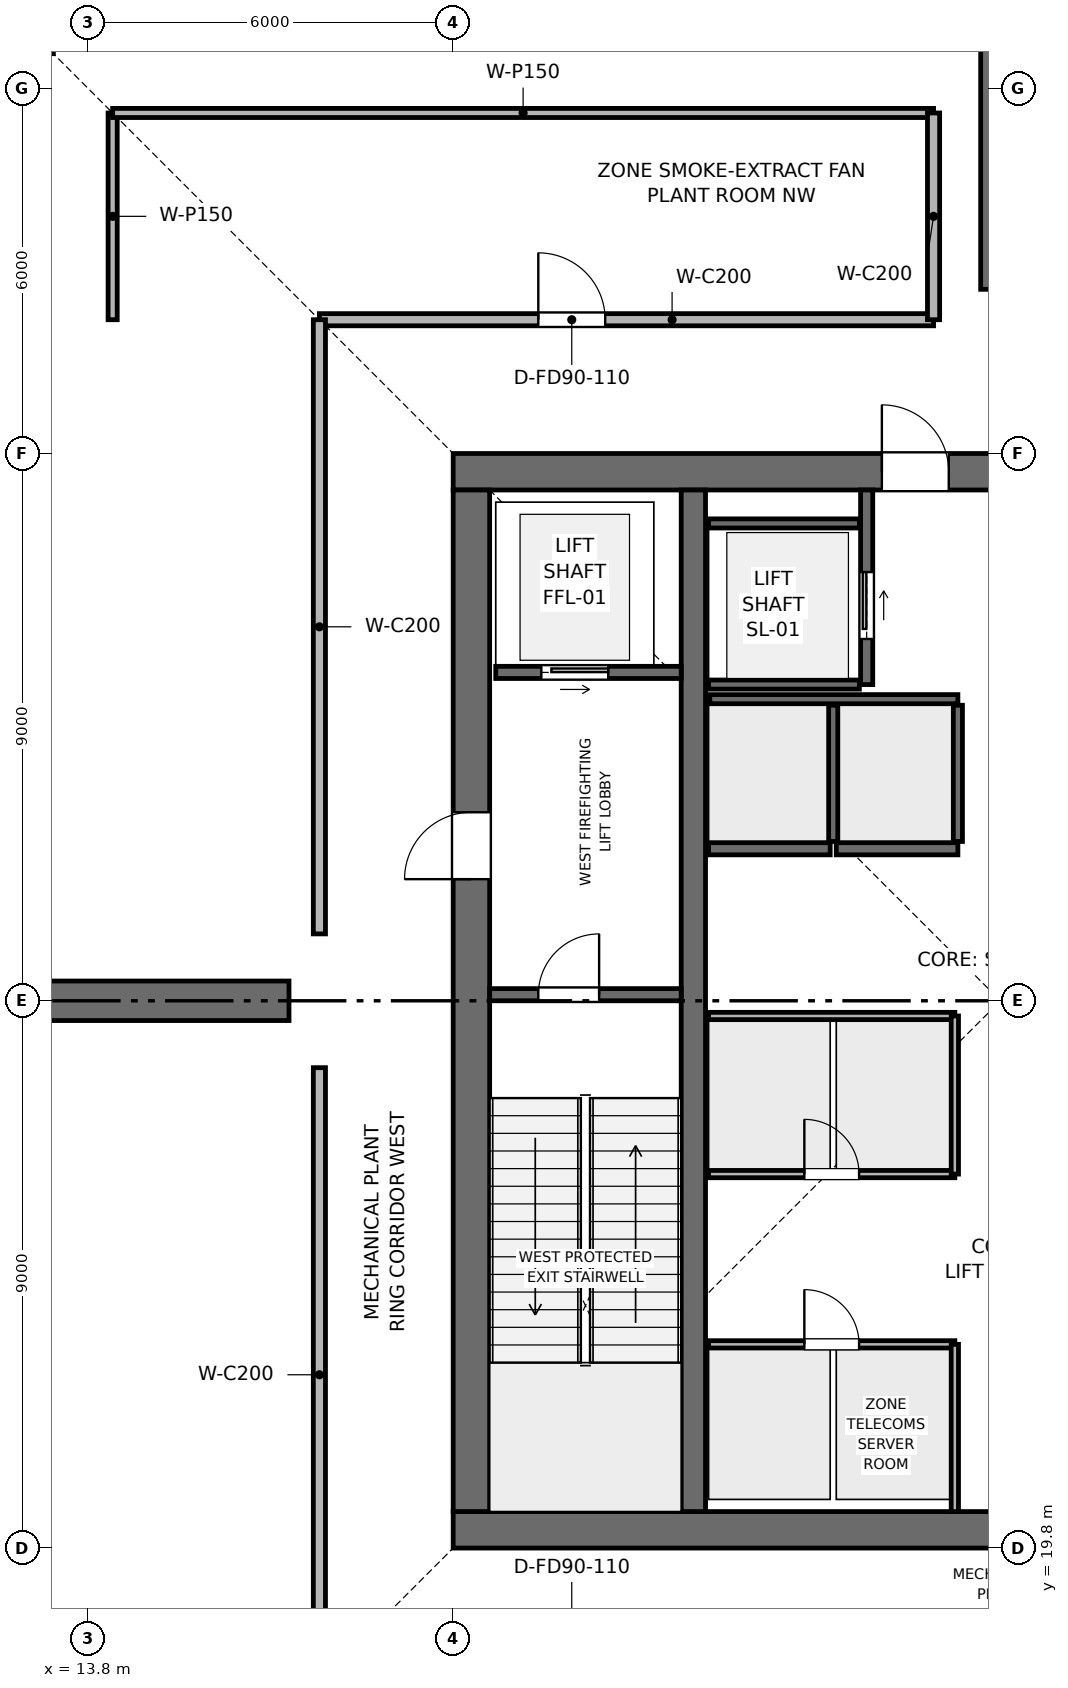
"""IFC4 building model, lengths in metres.
Left out: names, types, materials, properties, quantities, classifications, styles, units other than length and angle.
Written with IfcOpenShell. Run it as: python <this file> out.ifc"""

import sys

from ifc_helpers import new_model, si_unit, direction, frame, frame_2d, origin, origin_2d, place, context, subcontext, project, spatial, rectangle, extrude, element, fill, save


model = new_model("IFC4")
c1 = context("Model", 3, precision=1e-05, world=origin(), true_north=direction((0.0, 1.0)))
c2 = subcontext(c1, "Body", "Model", "MODEL_VIEW")
j1 = project(units=[si_unit("LENGTHUNIT", "METRE"), si_unit("PLANEANGLEUNIT", "RADIAN")], contexts=[c1])
p1 = place(None, origin())
s1 = spatial("IfcSite", under=j1, at=p1, CompositionType="ELEMENT")
p2 = place(p1, origin())
s2 = spatial("IfcBuilding", under=s1, at=p2, CompositionType="ELEMENT")
p3 = place(p2, frame((0.0, 0.0, 284.1)))
s3 = spatial("IfcBuildingStorey", under=s2, at=p3, CompositionType="ELEMENT", Elevation=284.1)
p4 = place(p3, frame((19.8, 20.1, 0.0), z_axis=(0.0, 0.0, 1.0), x_axis=(1.0, 0.0, 0.0)))
e1 = element("IfcWall", 1, at=p4, inside=s3, PredefinedType="SHEAR", context=c2, shape_type="SweptSolid", body=[
    extrude(rectangle(XDim=18.0, YDim=0.6, at=frame_2d((9.0, 0.0))), origin(), (0.0, 0.0, 1.0), 5.4),
])
p5 = place(p3, frame((19.8, 37.5, 0.0), z_axis=(0.0, 0.0, 1.0), x_axis=(1.0, 0.0, 0.0)))
e2 = element("IfcWall", 2, at=p5, inside=s3, PredefinedType="SHEAR", context=c2, shape_type="SweptSolid", body=[
    extrude(rectangle(XDim=18.0, YDim=0.6, at=frame_2d((9.0, 0.0))), origin(), (0.0, 0.0, 1.0), 5.4),
])
p6 = place(p5, frame((7.05, 0.0, 0.0)))
e3 = element("IfcOpeningElement", 3, at=p6, cuts=e2, PredefinedType="OPENING", context=c2, shape_type="SweptSolid", body=[
    extrude(rectangle(XDim=1.1, YDim=2.15, at=frame_2d((0.55, 1.075))), frame((0.0, 0.31, 0.0), z_axis=(0.0, -1.0, 0.0), x_axis=(1.0, 0.0, 0.0)), (0.0, 0.0, 1.0), 0.62),
])
p7 = place(p3, frame((20.1, 20.4, 0.0), z_axis=(0.0, 0.0, 1.0), x_axis=(0.0, 1.0, 0.0)))
e4 = element("IfcWall", 4, at=p7, inside=s3, PredefinedType="SHEAR", context=c2, shape_type="SweptSolid", body=[
    extrude(rectangle(XDim=16.8, YDim=0.6, at=frame_2d((8.4, 0.0))), origin(), (0.0, 0.0, 1.0), 5.4),
])
p8 = place(p7, frame((10.4, 0.0, 0.0)))
e5 = element("IfcOpeningElement", 5, at=p8, cuts=e4, PredefinedType="OPENING", context=c2, shape_type="SweptSolid", body=[
    extrude(rectangle(XDim=1.1, YDim=2.15, at=frame_2d((0.55, 1.075))), frame((0.0, 0.31, 0.0), z_axis=(0.0, -1.0, 0.0), x_axis=(1.0, 0.0, 0.0)), (0.0, 0.0, 1.0), 0.62),
])
p9 = place(p3, frame((23.75, 20.4, 0.0), z_axis=(0.0, 0.0, 1.0), x_axis=(0.0, 1.0, 0.0)))
e6 = element("IfcWall", 6, at=p9, inside=s3, PredefinedType="SHEAR", context=c2, shape_type="SweptSolid", body=[
    extrude(rectangle(XDim=16.8, YDim=0.4, at=frame_2d((8.4, 0.0))), origin(), (0.0, 0.0, 1.0), 5.4),
])
p10 = place(p3, frame((12.75, 44.85, 0.003), z_axis=(0.109878322657, -0.109878322657, 0.987852979152), x_axis=(0.707106781187, 0.707106781187, 0.0)))
e7 = element("IfcColumn", 7, at=p10, inside=s3, PredefinedType="COLUMN", context=c2, shape_type="SweptSolid", body=[
    extrude(rectangle(XDim=0.95, YDim=0.95, at=origin_2d()), origin(), (0.0, 0.0, 1.0), 5.106),
])
p11 = place(p3, frame((28.8, 40.5, 0.0), z_axis=(0.0, 0.0, 1.0), x_axis=(0.0, 1.0, 0.0)))
e8 = element("IfcWall", 8, at=p11, inside=s3, PredefinedType="SHEAR", context=c2, shape_type="SweptSolid", body=[
    extrude(rectangle(XDim=10.025, YDim=0.65, at=frame_2d((5.012, 0.0))), origin(), (0.0, 0.0, 1.0), 5.05),
])
p12 = place(p3, frame((17.1, 28.8, 0.0), z_axis=(0.0, 0.0, 1.0), x_axis=(-1.0, 0.0, 0.0)))
e9 = element("IfcWall", 9, at=p12, inside=s3, PredefinedType="SHEAR", context=c2, shape_type="SweptSolid", body=[
    extrude(rectangle(XDim=10.025, YDim=0.65, at=frame_2d((5.013, 0.0))), origin(), (0.0, 0.0, 1.0), 5.05),
])
p13 = place(p3, frame((20.4, 28.9, 0.0), z_axis=(0.0, 0.0, 1.0), x_axis=(1.0, 0.0, 0.0)))
e10 = element("IfcWall", 10, at=p13, inside=s3, PredefinedType="SHEAR", context=c2, shape_type="SweptSolid", body=[
    extrude(rectangle(XDim=3.15, YDim=0.2, at=frame_2d((1.575, 0.0))), origin(), (0.0, 0.0, 1.0), 5.05),
])
p14 = place(p13, frame((0.8, 0.0, 0.0)))
e11 = element("IfcOpeningElement", 11, at=p14, cuts=e10, PredefinedType="OPENING", context=c2, shape_type="SweptSolid", body=[
    extrude(rectangle(XDim=1.0, YDim=2.1, at=frame_2d((0.5, 1.05))), frame((0.0, 0.11, 0.0), z_axis=(0.0, -1.0, 0.0), x_axis=(1.0, 0.0, 0.0)), (0.0, 0.0, 1.0), 0.22),
])
p15 = place(p3, frame((20.5, 34.2, 0.0), z_axis=(0.0, 0.0, 1.0), x_axis=(1.0, 0.0, 0.0)))
e12 = element("IfcWall", 12, at=p15, inside=s3, PredefinedType="SHEAR", context=c2, shape_type="SweptSolid", body=[
    extrude(rectangle(XDim=3.05, YDim=0.2, at=frame_2d((1.525, 0.0))), origin(), (0.0, 0.0, 1.0), 5.05),
])
p16 = place(p15, frame((0.75, 0.0, 0.0)))
e13 = element("IfcOpeningElement", 13, at=p16, cuts=e12, PredefinedType="OPENING", context=c2, shape_type="SweptSolid", body=[
    extrude(rectangle(XDim=1.1, YDim=2.15, at=frame_2d((0.55, 1.075))), frame((0.0, 0.11, 0.0), z_axis=(0.0, -1.0, 0.0), x_axis=(1.0, 0.0, 0.0)), (0.0, 0.0, 1.0), 0.22),
])
p17 = place(p3, frame((26.6, 34.0, 0.0), z_axis=(0.0, 0.0, 1.0), x_axis=(0.0, 1.0, 0.0)))
e14 = element("IfcWall", 14, at=p17, inside=s3, PredefinedType="SHEAR", context=c2, shape_type="SweptSolid", body=[
    extrude(rectangle(XDim=3.2, YDim=0.2, at=frame_2d((1.6, 0.0))), origin(), (0.0, 0.0, 1.0), 5.05),
])
p18 = place(p17, frame((0.75, 0.0, 0.0)))
e15 = element("IfcOpeningElement", 15, at=p18, cuts=e14, PredefinedType="OPENING", context=c2, shape_type="SweptSolid", body=[
    extrude(rectangle(XDim=1.1, YDim=2.15, at=frame_2d((0.55, 1.075))), frame((0.0, 0.11, 0.0), z_axis=(0.0, -1.0, 0.0), x_axis=(1.0, 0.0, 0.0)), (0.0, 0.0, 1.0), 0.22),
])
for number, where, z_axis, x_axis in (
    (16, (24.0, 34.0, 0.0), (0.0, 0.0, 1.0), (1.0, 0.0, 0.0)),
    (17, (24.0, 36.65, 0.0), (0.0, 0.0, 1.0), (1.0, 0.0, 0.0)),
):
    element("IfcWall", number, at=place(p3, frame(where, z_axis=z_axis, x_axis=x_axis)), inside=s3, PredefinedType="SHEAR", context=c2, shape_type="SweptSolid", body=[
        extrude(rectangle(XDim=2.48, YDim=0.15, at=frame_2d((1.24, 0.0))), origin(), (0.0, 0.0, 1.0), 5.05),
    ])
for number, where, z_axis, x_axis in (
    (18, (24.0, 31.3, 0.0), (0.0, 0.0, 1.0), (1.0, 0.0, 0.0)),
    (19, (26.1, 31.3, 0.0), (0.0, 0.0, 1.0), (1.0, 0.0, 0.0)),
):
    element("IfcWall", number, at=place(p3, frame(where, z_axis=z_axis, x_axis=x_axis)), inside=s3, PredefinedType="SHEAR", context=c2, shape_type="SweptSolid", body=[
        extrude(rectangle(XDim=2.0, YDim=0.2, at=frame_2d((1.0, 0.0))), origin(), (0.0, 0.0, 1.0), 5.05),
    ])
p19 = place(p3, frame((24.02, 33.76, 0.0), z_axis=(0.0, 0.0, 1.0), x_axis=(1.0, 0.0, 0.0)))
e20 = element("IfcWall", 20, at=p19, inside=s3, PredefinedType="SHEAR", context=c2, shape_type="SweptSolid", body=[
    extrude(rectangle(XDim=4.08, YDim=0.15, at=frame_2d((2.04, 0.0))), origin(), (0.0, 0.0, 1.0), 5.05),
])
for number, where, z_axis, x_axis in (
    (21, (26.05, 31.42, 0.0), (0.0, 0.0, 1.0), (0.0, 1.0, 0.0)),
    (22, (28.1, 31.42, 0.0), (0.0, 0.0, 1.0), (0.0, 1.0, 0.0)),
):
    element("IfcWall", number, at=place(p3, frame(where, z_axis=z_axis, x_axis=x_axis)), inside=s3, PredefinedType="SHEAR", context=c2, shape_type="SweptSolid", body=[
        extrude(rectangle(XDim=2.24, YDim=0.15, at=frame_2d((1.12, 0.0))), origin(), (0.0, 0.0, 1.0), 5.05),
    ])
p20 = place(p3, frame((24.0, 23.15, 0.0), z_axis=(0.0, 0.0, 1.0), x_axis=(1.0, 0.0, 0.0)))
e23 = element("IfcWall", 23, at=p20, inside=s3, PredefinedType="PARTITIONING", context=c2, shape_type="SweptSolid", body=[
    extrude(rectangle(XDim=4.05, YDim=0.12, at=frame_2d((2.025, 0.0))), origin(), (0.0, 0.0, 1.0), 5.05),
])
p21 = place(p20, frame((1.575, 0.0, 0.0)))
e24 = element("IfcOpeningElement", 24, at=p21, cuts=e23, PredefinedType="OPENING", context=c2, shape_type="SweptSolid", body=[
    extrude(rectangle(XDim=0.9, YDim=2.1, at=frame_2d((0.45, 1.05))), frame((0.0, 0.07, 0.0), z_axis=(0.0, -1.0, 0.0), x_axis=(1.0, 0.0, 0.0)), (0.0, 0.0, 1.0), 0.14),
])
p22 = place(p3, frame((28.05, 20.4, 0.0), z_axis=(0.0, 0.0, 1.0), x_axis=(0.0, 1.0, 0.0)))
e25 = element("IfcWall", 25, at=p22, inside=s3, PredefinedType="PARTITIONING", context=c2, shape_type="SweptSolid", body=[
    extrude(rectangle(XDim=2.75, YDim=0.12, at=frame_2d((1.375, 0.0))), origin(), (0.0, 0.0, 1.0), 5.05),
])
p23 = place(p3, frame((24.0, 25.95, 0.0), z_axis=(0.0, 0.0, 1.0), x_axis=(1.0, 0.0, 0.0)))
e26 = element("IfcWall", 26, at=p23, inside=s3, PredefinedType="PARTITIONING", context=c2, shape_type="SweptSolid", body=[
    extrude(rectangle(XDim=4.05, YDim=0.12, at=frame_2d((2.025, 0.0))), origin(), (0.0, 0.0, 1.0), 5.05),
])
p24 = place(p23, frame((1.575, 0.0, 0.0)))
e27 = element("IfcOpeningElement", 27, at=p24, cuts=e26, PredefinedType="OPENING", context=c2, shape_type="SweptSolid", body=[
    extrude(rectangle(XDim=0.9, YDim=2.1, at=frame_2d((0.45, 1.05))), frame((0.0, 0.07, 0.0), z_axis=(0.0, -1.0, 0.0), x_axis=(1.0, 0.0, 0.0)), (0.0, 0.0, 1.0), 0.14),
])
p25 = place(p3, frame((24.0, 28.55, 0.0), z_axis=(0.0, 0.0, 1.0), x_axis=(1.0, 0.0, 0.0)))
e28 = element("IfcWall", 28, at=p25, inside=s3, PredefinedType="PARTITIONING", context=c2, shape_type="SweptSolid", body=[
    extrude(rectangle(XDim=4.05, YDim=0.12, at=frame_2d((2.025, 0.0))), origin(), (0.0, 0.0, 1.0), 5.05),
])
p26 = place(p3, frame((28.05, 25.95, 0.0), z_axis=(0.0, 0.0, 1.0), x_axis=(0.0, 1.0, 0.0)))
e29 = element("IfcWall", 29, at=p26, inside=s3, PredefinedType="PARTITIONING", context=c2, shape_type="SweptSolid", body=[
    extrude(rectangle(XDim=2.6, YDim=0.12, at=frame_2d((1.3, 0.0))), origin(), (0.0, 0.0, 1.0), 5.05),
])
p27 = place(p3, frame((17.6, 40.0, 0.0), z_axis=(0.0, 0.0, 1.0), x_axis=(1.0, 0.0, 0.0)))
e30 = element("IfcWall", 30, at=p27, inside=s3, PredefinedType="PARTITIONING", context=c2, shape_type="SweptSolid", body=[
    extrude(rectangle(XDim=10.1, YDim=0.2, at=frame_2d((5.05, 0.0))), origin(), (0.0, 0.0, 1.0), 4.635),
])
p28 = place(p27, frame((3.6, 0.0, 0.0)))
e31 = element("IfcOpeningElement", 31, at=p28, cuts=e30, PredefinedType="OPENING", context=c2, shape_type="SweptSolid", body=[
    extrude(rectangle(XDim=1.1, YDim=2.15, at=frame_2d((0.55, 1.075))), frame((0.0, 0.11, 0.0), z_axis=(0.0, -1.0, 0.0), x_axis=(1.0, 0.0, 0.0)), (0.0, 0.0, 1.0), 0.22),
])
p29 = place(p3, frame((17.6, 17.6, 0.0), z_axis=(0.0, 0.0, 1.0), x_axis=(0.0, 1.0, 0.0)))
e32 = element("IfcWall", 32, at=p29, inside=s3, PredefinedType="PARTITIONING", context=c2, shape_type="SweptSolid", body=[
    extrude(rectangle(XDim=10.1, YDim=0.2, at=frame_2d((5.05, 0.0))), origin(), (0.0, 0.0, 1.0), 4.635),
])
p30 = place(p3, frame((17.6, 29.9, 0.0), z_axis=(0.0, 0.0, 1.0), x_axis=(0.0, 1.0, 0.0)))
e33 = element("IfcWall", 33, at=p30, inside=s3, PredefinedType="PARTITIONING", context=c2, shape_type="SweptSolid", body=[
    extrude(rectangle(XDim=10.1, YDim=0.2, at=frame_2d((5.05, 0.0))), origin(), (0.0, 0.0, 1.0), 4.635),
])
p31 = place(p3, frame((14.2, 40.0, 0.0), z_axis=(0.0, 0.0, 1.0), x_axis=(0.0, 1.0, 0.0)))
e34 = element("IfcWall", 34, at=p31, inside=s3, PredefinedType="PARTITIONING", context=c2, shape_type="SweptSolid", body=[
    extrude(rectangle(XDim=3.4, YDim=0.15, at=frame_2d((1.7, 0.0))), origin(), (0.0, 0.0, 1.0), 4.635),
])
p32 = place(p3, frame((14.2, 43.4, 0.0), z_axis=(0.0, 0.0, 1.0), x_axis=(1.0, 0.0, 0.0)))
e35 = element("IfcWall", 35, at=p32, inside=s3, PredefinedType="PARTITIONING", context=c2, shape_type="SweptSolid", body=[
    extrude(rectangle(XDim=13.5, YDim=0.15, at=frame_2d((6.75, 0.0))), origin(), (0.0, 0.0, 1.0), 4.635),
])
p33 = place(p3, frame((27.7, 40.0, 0.0), z_axis=(0.0, 0.0, 1.0), x_axis=(0.0, 1.0, 0.0)))
e36 = element("IfcWall", 36, at=p33, inside=s3, PredefinedType="PARTITIONING", context=c2, shape_type="SweptSolid", body=[
    extrude(rectangle(XDim=3.4, YDim=0.2, at=frame_2d((1.7, 0.0))), origin(), (0.0, 0.0, 1.0), 4.675),
])
p34 = place(p14, origin())
e37 = element("IfcDoor", 37, at=p34, inside=s3, OperationType="SINGLE_SWING_RIGHT", PredefinedType="DOOR", context=c2, shape_type="SweptSolid", body=[
    extrude(rectangle(XDim=1.0, YDim=2.1, at=frame_2d((0.5, 1.05))), frame((0.0, 0.025, 0.0), z_axis=(0.0, -1.0, 0.0), x_axis=(1.0, 0.0, 0.0)), (0.0, 0.0, 1.0), 0.05),
])
fill(e11, e37)
p35 = place(p16, origin())
e38 = element("IfcDoor", 38, at=p35, inside=s3, OperationType="SLIDING_TO_RIGHT", PredefinedType="DOOR", context=c2, shape_type="SweptSolid", body=[
    extrude(rectangle(XDim=1.1, YDim=2.15, at=frame_2d((0.55, 1.075))), frame((0.0, 0.025, 0.0), z_axis=(0.0, -1.0, 0.0), x_axis=(1.0, 0.0, 0.0)), (0.0, 0.0, 1.0), 0.05),
])
fill(e13, e38)
p36 = place(p18, origin())
e39 = element("IfcDoor", 39, at=p36, inside=s3, OperationType="SLIDING_TO_RIGHT", PredefinedType="DOOR", context=c2, shape_type="SweptSolid", body=[
    extrude(rectangle(XDim=1.1, YDim=2.15, at=frame_2d((0.55, 1.075))), frame((0.0, 0.025, 0.0), z_axis=(0.0, -1.0, 0.0), x_axis=(1.0, 0.0, 0.0)), (0.0, 0.0, 1.0), 0.05),
])
fill(e15, e39)
p37 = place(p21, origin())
e40 = element("IfcDoor", 40, at=p37, inside=s3, OperationType="SINGLE_SWING_LEFT", PredefinedType="DOOR", context=c2, shape_type="SweptSolid", body=[
    extrude(rectangle(XDim=0.9, YDim=2.1, at=frame_2d((0.45, 1.05))), frame((0.0, 0.025, 0.0), z_axis=(0.0, -1.0, 0.0), x_axis=(1.0, 0.0, 0.0)), (0.0, 0.0, 1.0), 0.05),
])
fill(e24, e40)
p38 = place(p24, origin())
e41 = element("IfcDoor", 41, at=p38, inside=s3, OperationType="SINGLE_SWING_LEFT", PredefinedType="DOOR", context=c2, shape_type="SweptSolid", body=[
    extrude(rectangle(XDim=0.9, YDim=2.1, at=frame_2d((0.45, 1.05))), frame((0.0, 0.025, 0.0), z_axis=(0.0, -1.0, 0.0), x_axis=(1.0, 0.0, 0.0)), (0.0, 0.0, 1.0), 0.05),
])
fill(e27, e41)
p39 = place(p28, origin())
e42 = element("IfcDoor", 42, at=p39, inside=s3, OperationType="SINGLE_SWING_LEFT", PredefinedType="DOOR", context=c2, shape_type="SweptSolid", body=[
    extrude(rectangle(XDim=1.1, YDim=2.15, at=frame_2d((0.55, 1.075))), frame((0.0, 0.025, 0.0), z_axis=(0.0, -1.0, 0.0), x_axis=(1.0, 0.0, 0.0)), (0.0, 0.0, 1.0), 0.05),
])
fill(e31, e42)
p40 = place(p8, origin())
e43 = element("IfcDoor", 43, at=p40, inside=s3, OperationType="SINGLE_SWING_LEFT", PredefinedType="DOOR", context=c2, shape_type="SweptSolid", body=[
    extrude(rectangle(XDim=1.1, YDim=2.15, at=frame_2d((0.55, 1.075))), frame((0.0, 0.025, 0.0), z_axis=(0.0, -1.0, 0.0), x_axis=(1.0, 0.0, 0.0)), (0.0, 0.0, 1.0), 0.05),
])
fill(e5, e43)
p41 = place(p6, origin())
e44 = element("IfcDoor", 44, at=p41, inside=s3, OperationType="SINGLE_SWING_LEFT", PredefinedType="DOOR", context=c2, shape_type="SweptSolid", body=[
    extrude(rectangle(XDim=1.1, YDim=2.15, at=frame_2d((0.55, 1.075))), frame((0.0, 0.025, 0.0), z_axis=(0.0, -1.0, 0.0), x_axis=(1.0, 0.0, 0.0)), (0.0, 0.0, 1.0), 0.05),
])
fill(e3, e44)
save(model, sys.argv[1])
